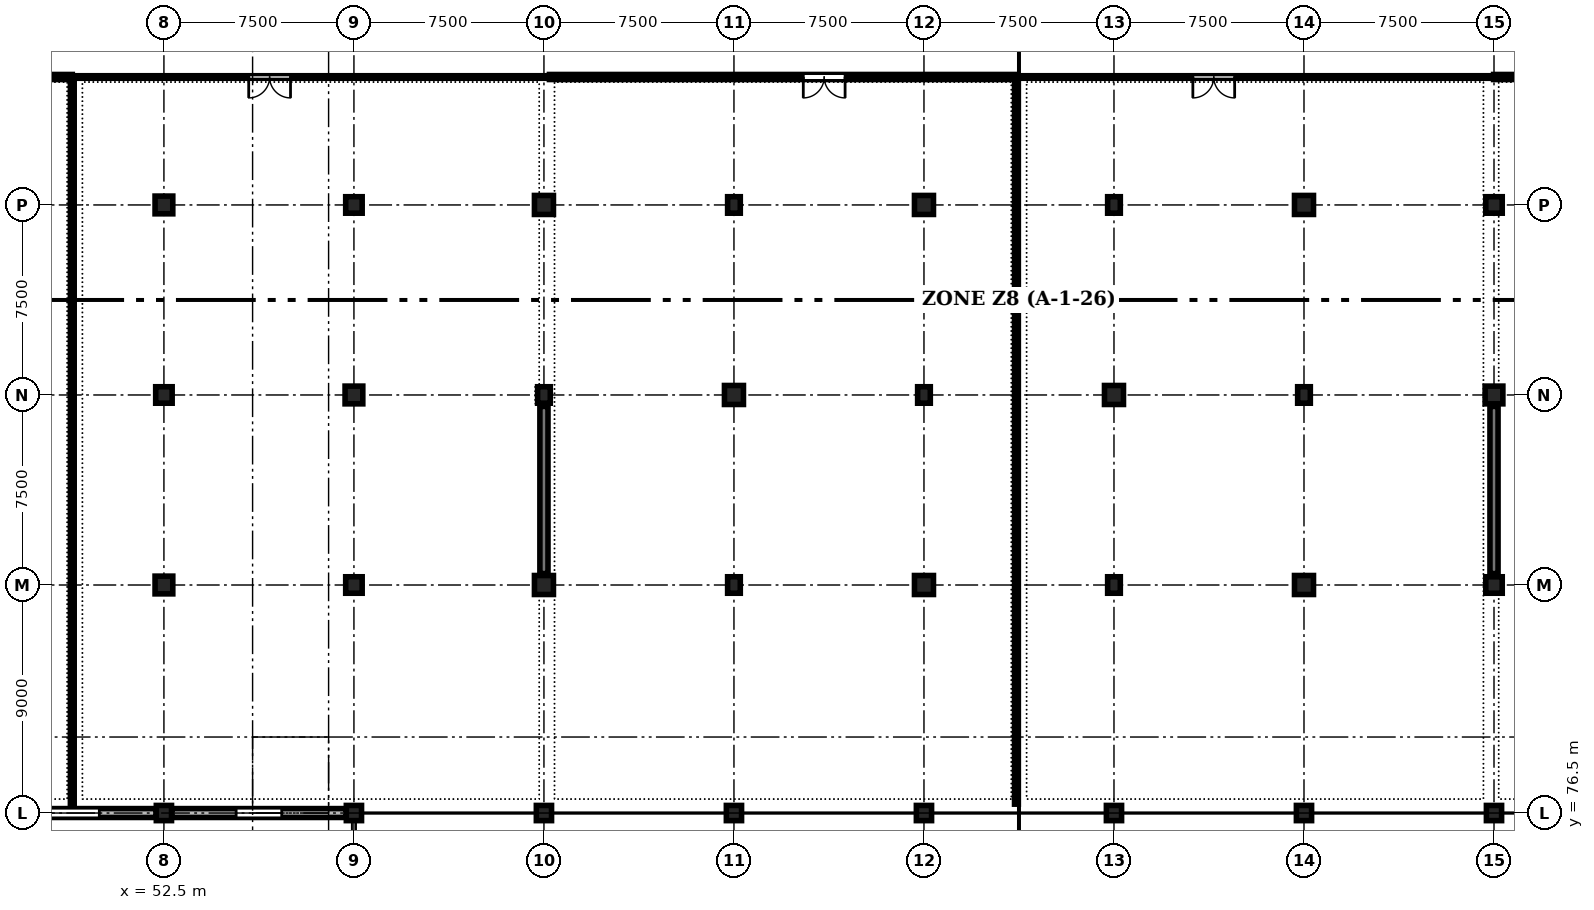
"""IFC4 building model, lengths in metres.
Left out: names, types, materials, properties, quantities, classifications, styles, units other than length and angle.
Written with IfcOpenShell. Run it as: python <this file> out.ifc"""

import sys

from ifc_helpers import new_model, si_unit, direction, frame, frame_2d, origin, origin_2d, place, context, subcontext, project, spatial, rectangle, circle, extrude, element, fill, save


model = new_model("IFC4")
c1 = context("Model", 3, precision=1e-05, world=origin(), true_north=direction((0.0, 1.0)))
c2 = subcontext(c1, "Body", "Model", "MODEL_VIEW")
j1 = project(units=[si_unit("LENGTHUNIT", "METRE"), si_unit("PLANEANGLEUNIT", "RADIAN")], contexts=[c1])
p1 = place(None, origin())
s1 = spatial("IfcSite", under=j1, at=p1, CompositionType="ELEMENT")
p2 = place(p1, origin())
s2 = spatial("IfcBuilding", under=s1, at=p2, CompositionType="ELEMENT")
p3 = place(p2, frame((0.0, 0.0, 4.8)))
s3 = spatial("IfcBuildingStorey", under=s2, at=p3, CompositionType="ELEMENT", Elevation=4.8)
p4 = place(p3, frame((52.5, 76.5, 0.0), z_axis=(0.0, 0.0, 1.0), x_axis=(1.0, 0.0, 0.0)))
e1 = element("IfcColumn", 1, at=p4, inside=s3, PredefinedType="COLUMN", context=c2, shape_type="SweptSolid", body=[
    extrude(rectangle(XDim=0.6, YDim=0.6, at=origin_2d()), origin(), (0.0, 0.0, 1.0), 4.5),
])
p5 = place(p3, frame((52.5, 85.5, 0.0), z_axis=(0.0, 0.0, 1.0), x_axis=(1.0, 0.0, 0.0)))
e2 = element("IfcColumn", 2, at=p5, inside=s3, PredefinedType="COLUMN", context=c2, shape_type="SweptSolid", body=[
    extrude(rectangle(XDim=0.7, YDim=0.7, at=origin_2d()), origin(), (0.0, 0.0, 1.0), 4.5),
])
p6 = place(p3, frame((52.5, 93.0, 0.0), z_axis=(0.0, 0.0, 1.0), x_axis=(1.0, 0.0, 0.0)))
e3 = element("IfcColumn", 3, at=p6, inside=s3, PredefinedType="COLUMN", context=c2, shape_type="SweptSolid", body=[
    extrude(rectangle(XDim=0.65, YDim=0.65, at=origin_2d()), origin(), (0.0, 0.0, 1.0), 4.5),
])
p7 = place(p3, frame((52.5, 100.5, 0.0), z_axis=(0.0, 0.0, 1.0), x_axis=(1.0, 0.0, 0.0)))
e4 = element("IfcColumn", 4, at=p7, inside=s3, PredefinedType="COLUMN", context=c2, shape_type="SweptSolid", body=[
    extrude(rectangle(XDim=0.7, YDim=0.7, at=origin_2d()), origin(), (0.0, 0.0, 1.0), 4.5),
])
p8 = place(p3, frame((60.0, 76.5, 0.0), z_axis=(0.0, 0.0, 1.0), x_axis=(1.0, 0.0, 0.0)))
e5 = element("IfcColumn", 5, at=p8, inside=s3, PredefinedType="COLUMN", context=c2, shape_type="SweptSolid", body=[
    extrude(circle(Radius=0.3, at=origin_2d()), origin(), (0.0, 0.0, 1.0), 4.5),
])
p9 = place(p3, frame((60.0, 85.5, 0.0), z_axis=(0.0, 0.0, 1.0), x_axis=(1.0, 0.0, 0.0)))
e6 = element("IfcColumn", 6, at=p9, inside=s3, PredefinedType="COLUMN", context=c2, shape_type="SweptSolid", body=[
    extrude(rectangle(XDim=0.65, YDim=0.65, at=origin_2d()), origin(), (0.0, 0.0, 1.0), 4.5),
])
p10 = place(p3, frame((60.0, 93.0, 0.0), z_axis=(0.0, 0.0, 1.0), x_axis=(1.0, 0.0, 0.0)))
e7 = element("IfcColumn", 7, at=p10, inside=s3, PredefinedType="COLUMN", context=c2, shape_type="SweptSolid", body=[
    extrude(rectangle(XDim=0.7, YDim=0.7, at=origin_2d()), origin(), (0.0, 0.0, 1.0), 4.5),
])
p11 = place(p3, frame((60.0, 100.5, 0.0), z_axis=(0.0, 0.0, 1.0), x_axis=(1.0, 0.0, 0.0)))
e8 = element("IfcColumn", 8, at=p11, inside=s3, PredefinedType="COLUMN", context=c2, shape_type="SweptSolid", body=[
    extrude(rectangle(XDim=0.65, YDim=0.65, at=origin_2d()), origin(), (0.0, 0.0, 1.0), 4.5),
])
p12 = place(p3, frame((67.5, 76.5, 0.0), z_axis=(0.0, 0.0, 1.0), x_axis=(1.0, 0.0, 0.0)))
e9 = element("IfcColumn", 9, at=p12, inside=s3, PredefinedType="COLUMN", context=c2, shape_type="SweptSolid", body=[
    extrude(rectangle(XDim=0.6, YDim=0.6, at=origin_2d()), origin(), (0.0, 0.0, 1.0), 4.5),
])
p13 = place(p3, frame((67.5, 85.5, 0.0), z_axis=(0.0, 0.0, 1.0), x_axis=(1.0, 0.0, 0.0)))
e10 = element("IfcColumn", 10, at=p13, inside=s3, PredefinedType="COLUMN", context=c2, shape_type="SweptSolid", body=[
    extrude(rectangle(XDim=0.75, YDim=0.75, at=origin_2d()), origin(), (0.0, 0.0, 1.0), 4.5),
])
p14 = place(p3, frame((67.5, 93.0, 0.0), z_axis=(0.0, 0.0, 1.0), x_axis=(1.0, 0.0, 0.0)))
e11 = element("IfcColumn", 11, at=p14, inside=s3, PredefinedType="COLUMN", context=c2, shape_type="SweptSolid", body=[
    extrude(rectangle(XDim=0.5, YDim=0.65, at=origin_2d()), origin(), (0.0, 0.0, 1.0), 4.5),
])
p15 = place(p3, frame((67.5, 100.5, 0.0), z_axis=(0.0, 0.0, 1.0), x_axis=(1.0, 0.0, 0.0)))
e12 = element("IfcColumn", 12, at=p15, inside=s3, PredefinedType="COLUMN", context=c2, shape_type="SweptSolid", body=[
    extrude(rectangle(XDim=0.75, YDim=0.75, at=origin_2d()), origin(), (0.0, 0.0, 1.0), 4.5),
])
p16 = place(p3, frame((75.0, 76.5, 0.0), z_axis=(0.0, 0.0, 1.0), x_axis=(1.0, 0.0, 0.0)))
e13 = element("IfcColumn", 13, at=p16, inside=s3, PredefinedType="COLUMN", context=c2, shape_type="SweptSolid", body=[
    extrude(rectangle(XDim=0.6, YDim=0.6, at=origin_2d()), origin(), (0.0, 0.0, 1.0), 4.5),
])
p17 = place(p3, frame((75.0, 85.5, 0.0), z_axis=(0.0, 0.0, 1.0), x_axis=(1.0, 0.0, 0.0)))
e14 = element("IfcColumn", 14, at=p17, inside=s3, PredefinedType="COLUMN", context=c2, shape_type="SweptSolid", body=[
    extrude(rectangle(XDim=0.5, YDim=0.65, at=origin_2d()), origin(), (0.0, 0.0, 1.0), 4.5),
])
p18 = place(p3, frame((75.0, 93.0, 0.0), z_axis=(0.0, 0.0, 1.0), x_axis=(1.0, 0.0, 0.0)))
e15 = element("IfcColumn", 15, at=p18, inside=s3, PredefinedType="COLUMN", context=c2, shape_type="SweptSolid", body=[
    extrude(rectangle(XDim=0.75, YDim=0.75, at=origin_2d()), origin(), (0.0, 0.0, 1.0), 4.5),
])
p19 = place(p3, frame((75.0, 100.5, 0.0), z_axis=(0.0, 0.0, 1.0), x_axis=(1.0, 0.0, 0.0)))
e16 = element("IfcColumn", 16, at=p19, inside=s3, PredefinedType="COLUMN", context=c2, shape_type="SweptSolid", body=[
    extrude(rectangle(XDim=0.5, YDim=0.65, at=origin_2d()), origin(), (0.0, 0.0, 1.0), 4.5),
])
p20 = place(p3, frame((82.5, 76.5, 0.0), z_axis=(0.0, 0.0, 1.0), x_axis=(1.0, 0.0, 0.0)))
e17 = element("IfcColumn", 17, at=p20, inside=s3, PredefinedType="COLUMN", context=c2, shape_type="SweptSolid", body=[
    extrude(circle(Radius=0.3, at=origin_2d()), origin(), (0.0, 0.0, 1.0), 4.5),
])
p21 = place(p3, frame((82.5, 85.5, 0.0), z_axis=(0.0, 0.0, 1.0), x_axis=(1.0, 0.0, 0.0)))
e18 = element("IfcColumn", 18, at=p21, inside=s3, PredefinedType="COLUMN", context=c2, shape_type="SweptSolid", body=[
    extrude(rectangle(XDim=0.75, YDim=0.75, at=origin_2d()), origin(), (0.0, 0.0, 1.0), 4.5),
])
p22 = place(p3, frame((82.5, 93.0, 0.0), z_axis=(0.0, 0.0, 1.0), x_axis=(1.0, 0.0, 0.0)))
e19 = element("IfcColumn", 19, at=p22, inside=s3, PredefinedType="COLUMN", context=c2, shape_type="SweptSolid", body=[
    extrude(rectangle(XDim=0.5, YDim=0.65, at=origin_2d()), origin(), (0.0, 0.0, 1.0), 4.5),
])
p23 = place(p3, frame((82.5, 100.5, 0.0), z_axis=(0.0, 0.0, 1.0), x_axis=(1.0, 0.0, 0.0)))
e20 = element("IfcColumn", 20, at=p23, inside=s3, PredefinedType="COLUMN", context=c2, shape_type="SweptSolid", body=[
    extrude(rectangle(XDim=0.75, YDim=0.75, at=origin_2d()), origin(), (0.0, 0.0, 1.0), 4.5),
])
p24 = place(p3, frame((90.0, 76.5, 0.0), z_axis=(0.0, 0.0, 1.0), x_axis=(1.0, 0.0, 0.0)))
e21 = element("IfcColumn", 21, at=p24, inside=s3, PredefinedType="COLUMN", context=c2, shape_type="SweptSolid", body=[
    extrude(rectangle(XDim=0.6, YDim=0.6, at=origin_2d()), origin(), (0.0, 0.0, 1.0), 4.5),
])
p25 = place(p3, frame((90.0, 85.5, 0.0), z_axis=(0.0, 0.0, 1.0), x_axis=(1.0, 0.0, 0.0)))
e22 = element("IfcColumn", 22, at=p25, inside=s3, PredefinedType="COLUMN", context=c2, shape_type="SweptSolid", body=[
    extrude(rectangle(XDim=0.5, YDim=0.65, at=origin_2d()), origin(), (0.0, 0.0, 1.0), 4.5),
])
p26 = place(p3, frame((90.0, 93.0, 0.0), z_axis=(0.0, 0.0, 1.0), x_axis=(1.0, 0.0, 0.0)))
e23 = element("IfcColumn", 23, at=p26, inside=s3, PredefinedType="COLUMN", context=c2, shape_type="SweptSolid", body=[
    extrude(rectangle(XDim=0.75, YDim=0.75, at=origin_2d()), origin(), (0.0, 0.0, 1.0), 4.5),
])
p27 = place(p3, frame((90.0, 100.5, 0.0), z_axis=(0.0, 0.0, 1.0), x_axis=(1.0, 0.0, 0.0)))
e24 = element("IfcColumn", 24, at=p27, inside=s3, PredefinedType="COLUMN", context=c2, shape_type="SweptSolid", body=[
    extrude(rectangle(XDim=0.5, YDim=0.65, at=origin_2d()), origin(), (0.0, 0.0, 1.0), 4.5),
])
p28 = place(p3, frame((97.5, 76.5, 0.0), z_axis=(0.0, 0.0, 1.0), x_axis=(1.0, 0.0, 0.0)))
e25 = element("IfcColumn", 25, at=p28, inside=s3, PredefinedType="COLUMN", context=c2, shape_type="SweptSolid", body=[
    extrude(rectangle(XDim=0.6, YDim=0.6, at=origin_2d()), origin(), (0.0, 0.0, 1.0), 4.5),
])
p29 = place(p3, frame((97.5, 85.5, 0.0), z_axis=(0.0, 0.0, 1.0), x_axis=(1.0, 0.0, 0.0)))
e26 = element("IfcColumn", 26, at=p29, inside=s3, PredefinedType="COLUMN", context=c2, shape_type="SweptSolid", body=[
    extrude(rectangle(XDim=0.75, YDim=0.75, at=origin_2d()), origin(), (0.0, 0.0, 1.0), 4.5),
])
p30 = place(p3, frame((97.5, 93.0, 0.0), z_axis=(0.0, 0.0, 1.0), x_axis=(1.0, 0.0, 0.0)))
e27 = element("IfcColumn", 27, at=p30, inside=s3, PredefinedType="COLUMN", context=c2, shape_type="SweptSolid", body=[
    extrude(rectangle(XDim=0.5, YDim=0.65, at=origin_2d()), origin(), (0.0, 0.0, 1.0), 4.5),
])
p31 = place(p3, frame((97.5, 100.5, 0.0), z_axis=(0.0, 0.0, 1.0), x_axis=(1.0, 0.0, 0.0)))
e28 = element("IfcColumn", 28, at=p31, inside=s3, PredefinedType="COLUMN", context=c2, shape_type="SweptSolid", body=[
    extrude(rectangle(XDim=0.75, YDim=0.75, at=origin_2d()), origin(), (0.0, 0.0, 1.0), 4.5),
])
p32 = place(p3, frame((105.0, 76.5, 0.0), z_axis=(0.0, 0.0, 1.0), x_axis=(1.0, 0.0, 0.0)))
e29 = element("IfcColumn", 29, at=p32, inside=s3, PredefinedType="COLUMN", context=c2, shape_type="SweptSolid", body=[
    extrude(circle(Radius=0.3, at=origin_2d()), origin(), (0.0, 0.0, 1.0), 4.5),
])
p33 = place(p3, frame((105.0, 85.5, 0.0), z_axis=(0.0, 0.0, 1.0), x_axis=(1.0, 0.0, 0.0)))
e30 = element("IfcColumn", 30, at=p33, inside=s3, PredefinedType="COLUMN", context=c2, shape_type="SweptSolid", body=[
    extrude(rectangle(XDim=0.65, YDim=0.65, at=origin_2d()), origin(), (0.0, 0.0, 1.0), 4.5),
])
p34 = place(p3, frame((105.0, 93.0, 0.0), z_axis=(0.0, 0.0, 1.0), x_axis=(1.0, 0.0, 0.0)))
e31 = element("IfcColumn", 31, at=p34, inside=s3, PredefinedType="COLUMN", context=c2, shape_type="SweptSolid", body=[
    extrude(rectangle(XDim=0.7, YDim=0.7, at=origin_2d()), origin(), (0.0, 0.0, 1.0), 4.5),
])
p35 = place(p3, frame((105.0, 100.5, 0.0), z_axis=(0.0, 0.0, 1.0), x_axis=(1.0, 0.0, 0.0)))
e32 = element("IfcColumn", 32, at=p35, inside=s3, PredefinedType="COLUMN", context=c2, shape_type="SweptSolid", body=[
    extrude(rectangle(XDim=0.65, YDim=0.65, at=origin_2d()), origin(), (0.0, 0.0, 1.0), 4.5),
])
for number, where, z_axis, x_axis in (
    (33, (67.5, 85.95, 0.0), (0.0, 0.0, 1.0), (0.0, 1.0, 0.0)),
    (34, (105.0, 85.95, 0.0), (0.0, 0.0, 1.0), (0.0, 1.0, 0.0)),
):
    element("IfcWall", number, at=place(p3, frame(where, z_axis=z_axis, x_axis=x_axis)), inside=s3, PredefinedType="SHEAR", context=c2, shape_type="SweptSolid", body=[
        extrude(rectangle(XDim=6.6, YDim=0.32, at=frame_2d((3.3, 0.0))), origin(), (0.0, 0.0, 1.0), 3.63),
    ])
p36 = place(p3, frame((52.19, 76.5, 0.0), z_axis=(0.0, 0.0, 1.0), x_axis=(-1.0, 0.0, 0.0)))
e35 = element("IfcWall", 35, at=p36, inside=s3, PredefinedType="STANDARD", context=c2, shape_type="SweptSolid", body=[
    extrude(rectangle(XDim=6.88, YDim=0.35, at=frame_2d((3.44, 0.0))), origin(), (0.0, 0.0, 1.0), 3.63),
])
p37 = place(p36, frame((2.24, 0.0, 0.9)))
e36 = element("IfcOpeningElement", 36, at=p37, cuts=e35, PredefinedType="OPENING", context=c2, shape_type="SweptSolid", body=[
    extrude(rectangle(XDim=2.4, YDim=2.45, at=frame_2d((1.2, 1.225))), frame((0.0, 0.185, 0.0), z_axis=(0.0, -1.0, 0.0), x_axis=(1.0, 0.0, 0.0)), (0.0, 0.0, 1.0), 0.37),
])
p38 = place(p3, frame((59.69, 76.5, 0.0), z_axis=(0.0, 0.0, 1.0), x_axis=(-1.0, 0.0, 0.0)))
e37 = element("IfcWall", 37, at=p38, inside=s3, PredefinedType="STANDARD", context=c2, shape_type="SweptSolid", body=[
    extrude(rectangle(XDim=6.88, YDim=0.35, at=frame_2d((3.44, 0.0))), origin(), (0.0, 0.0, 1.0), 3.63),
])
p39 = place(p38, frame((2.54, 0.0, 0.9)))
e38 = element("IfcOpeningElement", 38, at=p39, cuts=e37, PredefinedType="OPENING", context=c2, shape_type="SweptSolid", body=[
    extrude(rectangle(XDim=1.8, YDim=2.1, at=frame_2d((0.9, 1.05))), frame((0.0, 0.185, 0.0), z_axis=(0.0, -1.0, 0.0), x_axis=(1.0, 0.0, 0.0)), (0.0, 0.0, 1.0), 0.37),
])
p40 = place(p3, frame((48.883, 105.55, 0.0), z_axis=(0.0, 0.0, 1.0), x_axis=(-1.0, 0.0, 0.0)))
e39 = element("IfcWall", 39, at=p40, inside=s3, PredefinedType="STANDARD", context=c2, shape_type="SweptSolid", body=[
    extrude(rectangle(XDim=18.433, YDim=0.2, at=frame_2d((9.217, 0.0))), origin(), (0.0, 0.0, 1.0), 4.165),
])
p41 = place(p40, frame((6.763, 0.0, 0.0)))
e40 = element("IfcOpeningElement", 40, at=p41, cuts=e39, PredefinedType="OPENING", context=c2, shape_type="SweptSolid", body=[
    extrude(rectangle(XDim=1.65, YDim=2.35, at=frame_2d((0.825, 1.175))), frame((0.0, 0.11, 0.0), z_axis=(0.0, -1.0, 0.0), x_axis=(1.0, 0.0, 0.0)), (0.0, 0.0, 1.0), 0.22),
])
p42 = place(p3, frame((67.517, 105.55, 0.0), z_axis=(0.0, 0.0, 1.0), x_axis=(-1.0, 0.0, 0.0)))
e41 = element("IfcWall", 41, at=p42, inside=s3, PredefinedType="PARTITIONING", context=c2, shape_type="SweptSolid", body=[
    extrude(rectangle(XDim=18.433, YDim=0.1, at=frame_2d((9.217, 0.0))), origin(), (0.0, 0.0, 1.0), 4.165),
])
p43 = place(p42, frame((10.02, 0.0, 0.0)))
e42 = element("IfcOpeningElement", 42, at=p43, cuts=e41, PredefinedType="OPENING", context=c2, shape_type="SweptSolid", body=[
    extrude(rectangle(XDim=1.65, YDim=2.35, at=frame_2d((0.825, 1.175))), frame((0.0, 0.06, 0.0), z_axis=(0.0, -1.0, 0.0), x_axis=(1.0, 0.0, 0.0)), (0.0, 0.0, 1.0), 0.12),
])
p44 = place(p3, frame((86.15, 105.55, 0.0), z_axis=(0.0, 0.0, 1.0), x_axis=(-1.0, 0.0, 0.0)))
e43 = element("IfcWall", 43, at=p44, inside=s3, PredefinedType="STANDARD", context=c2, shape_type="SweptSolid", body=[
    extrude(rectangle(XDim=18.433, YDim=0.2, at=frame_2d((9.217, 0.0))), origin(), (0.0, 0.0, 1.0), 4.165),
])
p45 = place(p44, frame((6.763, 0.0, 0.0)))
e44 = element("IfcOpeningElement", 44, at=p45, cuts=e43, PredefinedType="OPENING", context=c2, shape_type="SweptSolid", body=[
    extrude(rectangle(XDim=1.65, YDim=2.35, at=frame_2d((0.825, 1.175))), frame((0.0, 0.11, 0.0), z_axis=(0.0, -1.0, 0.0), x_axis=(1.0, 0.0, 0.0)), (0.0, 0.0, 1.0), 0.22),
])
p46 = place(p3, frame((104.783, 105.55, 0.0), z_axis=(0.0, 0.0, 1.0), x_axis=(-1.0, 0.0, 0.0)))
e45 = element("IfcWall", 45, at=p46, inside=s3, PredefinedType="PARTITIONING", context=c2, shape_type="SweptSolid", body=[
    extrude(rectangle(XDim=18.433, YDim=0.1, at=frame_2d((9.217, 0.0))), origin(), (0.0, 0.0, 1.0), 4.165),
])
p47 = place(p46, frame((10.02, 0.0, 0.0)))
e46 = element("IfcOpeningElement", 46, at=p47, cuts=e45, PredefinedType="OPENING", context=c2, shape_type="SweptSolid", body=[
    extrude(rectangle(XDim=1.65, YDim=2.35, at=frame_2d((0.825, 1.175))), frame((0.0, 0.06, 0.0), z_axis=(0.0, -1.0, 0.0), x_axis=(1.0, 0.0, 0.0)), (0.0, 0.0, 1.0), 0.12),
])
p48 = place(p3, frame((123.417, 105.55, 0.0), z_axis=(0.0, 0.0, 1.0), x_axis=(-1.0, 0.0, 0.0)))
e47 = element("IfcWall", 47, at=p48, inside=s3, PredefinedType="STANDARD", context=c2, shape_type="SweptSolid", body=[
    extrude(rectangle(XDim=18.433, YDim=0.2, at=frame_2d((9.217, 0.0))), origin(), (0.0, 0.0, 1.0), 4.165),
])
p49 = place(p48, frame((6.763, 0.0, 0.0)))
e48 = element("IfcOpeningElement", 48, at=p49, cuts=e47, PredefinedType="OPENING", context=c2, shape_type="SweptSolid", body=[
    extrude(rectangle(XDim=1.65, YDim=2.35, at=frame_2d((0.825, 1.175))), frame((0.0, 0.11, 0.0), z_axis=(0.0, -1.0, 0.0), x_axis=(1.0, 0.0, 0.0)), (0.0, 0.0, 1.0), 0.22),
])
for number, where, z_axis, x_axis in (
    (49, (48.883, 76.85, 0.0), (0.0, 0.0, 1.0), (0.0, 1.0, 0.0)),
    (50, (86.15, 76.85, 0.0), (0.0, 0.0, 1.0), (0.0, 1.0, 0.0)),
):
    element("IfcWall", number, at=place(p3, frame(where, z_axis=z_axis, x_axis=x_axis)), inside=s3, PredefinedType="PARTITIONING", context=c2, shape_type="SweptSolid", body=[
        extrude(rectangle(XDim=28.7, YDim=0.15, at=frame_2d((14.35, 0.0))), origin(), (0.0, 0.0, 1.0), 3.765),
    ])
p50 = place(p37, origin())
e51 = element("IfcWindow", 51, at=p50, inside=s3, PartitioningType="SINGLE_PANEL", PredefinedType="WINDOW", context=c2, shape_type="SweptSolid", body=[
    extrude(rectangle(XDim=2.4, YDim=2.45, at=frame_2d((1.2, 1.225))), frame((0.0, 0.03, 0.0), z_axis=(0.0, -1.0, 0.0), x_axis=(1.0, 0.0, 0.0)), (0.0, 0.0, 1.0), 0.06),
])
fill(e36, e51)
p51 = place(p39, origin())
e52 = element("IfcWindow", 52, at=p51, inside=s3, PartitioningType="SINGLE_PANEL", PredefinedType="WINDOW", context=c2, shape_type="SweptSolid", body=[
    extrude(rectangle(XDim=1.8, YDim=2.1, at=frame_2d((0.9, 1.05))), frame((0.0, 0.03, 0.0), z_axis=(0.0, -1.0, 0.0), x_axis=(1.0, 0.0, 0.0)), (0.0, 0.0, 1.0), 0.06),
])
fill(e38, e52)
p52 = place(p43, origin())
e53 = element("IfcDoor", 53, at=p52, inside=s3, OperationType="DOUBLE_DOOR_SINGLE_SWING", PredefinedType="DOOR", context=c2, shape_type="SweptSolid", body=[
    extrude(rectangle(XDim=1.65, YDim=2.35, at=frame_2d((0.825, 1.175))), frame((0.0, 0.025, 0.0), z_axis=(0.0, -1.0, 0.0), x_axis=(1.0, 0.0, 0.0)), (0.0, 0.0, 1.0), 0.05),
])
fill(e42, e53)
p53 = place(p45, origin())
e54 = element("IfcDoor", 54, at=p53, inside=s3, OperationType="DOUBLE_DOOR_SINGLE_SWING", PredefinedType="DOOR", context=c2, shape_type="SweptSolid", body=[
    extrude(rectangle(XDim=1.65, YDim=2.35, at=frame_2d((0.825, 1.175))), frame((0.0, 0.025, 0.0), z_axis=(0.0, -1.0, 0.0), x_axis=(1.0, 0.0, 0.0)), (0.0, 0.0, 1.0), 0.05),
])
fill(e44, e54)
p54 = place(p47, origin())
e55 = element("IfcDoor", 55, at=p54, inside=s3, OperationType="DOUBLE_DOOR_SINGLE_SWING", PredefinedType="DOOR", context=c2, shape_type="SweptSolid", body=[
    extrude(rectangle(XDim=1.65, YDim=2.35, at=frame_2d((0.825, 1.175))), frame((0.0, 0.025, 0.0), z_axis=(0.0, -1.0, 0.0), x_axis=(1.0, 0.0, 0.0)), (0.0, 0.0, 1.0), 0.05),
])
fill(e46, e55)
save(model, sys.argv[1])
